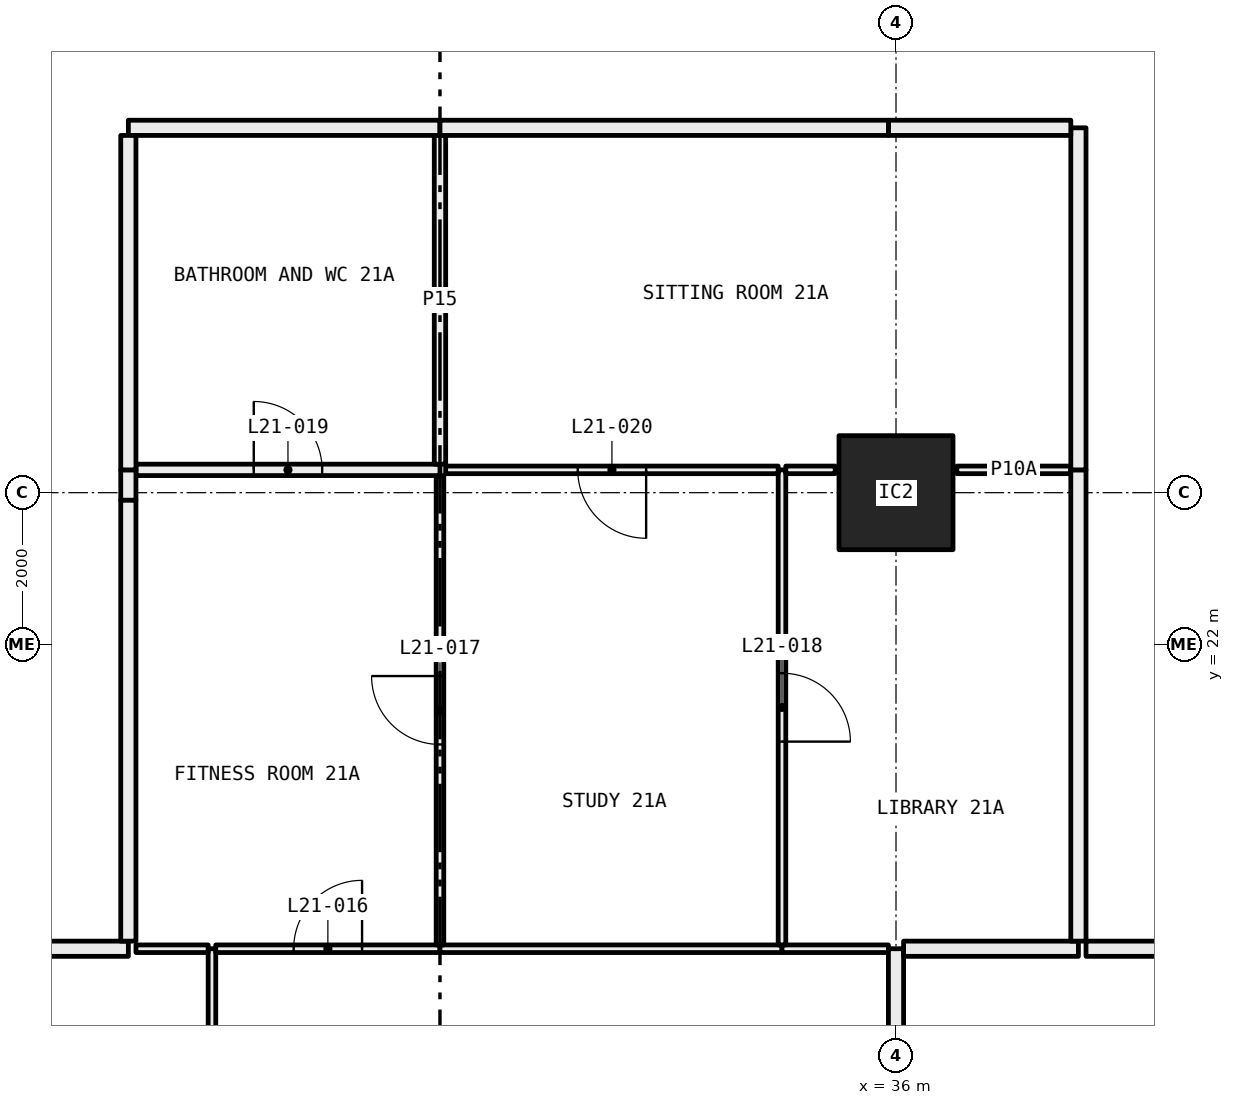
"""IFC4 building model, lengths in metres.
Left out: names, types, materials, properties, quantities, classifications, styles, units other than length and angle.
Written with IfcOpenShell. Run it as: python <this file> out.ifc"""

import sys

from ifc_helpers import new_model, si_unit, direction, frame, frame_2d, origin, origin_2d, place, context, subcontext, project, spatial, rectangle, hollow_rectangle, extrude, element, fill, save


model = new_model("IFC4")
c1 = context("Model", 3, precision=1e-05, world=origin(), true_north=direction((0.0, 1.0)))
c2 = subcontext(c1, "Body", "Model", "MODEL_VIEW")
j1 = project(units=[si_unit("LENGTHUNIT", "METRE"), si_unit("PLANEANGLEUNIT", "RADIAN")], contexts=[c1])
p1 = place(None, origin())
s1 = spatial("IfcSite", under=j1, at=p1, CompositionType="ELEMENT")
p2 = place(p1, origin())
s2 = spatial("IfcBuilding", under=s1, at=p2, CompositionType="ELEMENT")
p3 = place(p2, frame((0.0, 0.0, 85.2)))
s3 = spatial("IfcBuildingStorey", under=s2, at=p3, CompositionType="ELEMENT", Elevation=85.2)
p4 = place(p3, frame((36.0, 24.0, 0.0), z_axis=(0.0, 0.0, 1.0), x_axis=(1.0, 0.0, 0.0)))
e1 = element("IfcColumn", 1, at=p4, inside=s3, PredefinedType="COLUMN", context=c2, shape_type="SweptSolid", body=[
    extrude(hollow_rectangle(XDim=1.5, YDim=1.5, WallThickness=0.065, at=origin_2d()), origin(), (0.0, 0.0, 1.0), 3.05),
])
p5 = place(p3, frame((27.0, 12.05, 0.0), z_axis=(0.0, 0.0, 1.0), x_axis=(0.0, 1.0, 0.0)))
e2 = element("IfcWall", 2, at=p5, inside=s3, PredefinedType="PARTITIONING", context=c2, shape_type="SweptSolid", body=[
    extrude(rectangle(XDim=5.95, YDim=0.1, at=frame_2d((2.975, 0.0))), origin(), (0.0, 0.0, 1.0), 2.45),
])
p6 = place(p3, frame((26.95, 18.0, 0.0), z_axis=(0.0, 0.0, 1.0), x_axis=(-1.0, 0.0, 0.0)))
e3 = element("IfcWall", 3, at=p6, inside=s3, PredefinedType="PARTITIONING", context=c2, shape_type="SweptSolid", body=[
    extrude(rectangle(XDim=0.95, YDim=0.1, at=frame_2d((0.475, 0.0))), origin(), (0.0, 0.0, 1.0), 3.05),
])
p7 = place(p3, frame((25.9, 18.0, 0.0), z_axis=(0.0, 0.0, 1.0), x_axis=(-1.0, 0.0, 0.0)))
e4 = element("IfcWall", 4, at=p7, inside=s3, PredefinedType="PARTITIONING", context=c2, shape_type="SweptSolid", body=[
    extrude(rectangle(XDim=6.4, YDim=0.2, at=frame_2d((3.2, 0.0))), origin(), (0.0, 0.0, 1.0), 3.05),
])
p8 = place(p3, frame((30.0, 18.0, 0.0), z_axis=(0.0, 0.0, 1.0), x_axis=(-1.0, 0.0, 0.0)))
e5 = element("IfcWall", 5, at=p8, inside=s3, PredefinedType="PARTITIONING", context=c2, shape_type="SweptSolid", body=[
    extrude(rectangle(XDim=2.95, YDim=0.1, at=frame_2d((1.475, 0.0))), origin(), (0.0, 0.0, 1.0), 3.05),
])
p9 = place(p8, frame((1.025, 0.0, 0.0)))
e6 = element("IfcOpeningElement", 6, at=p9, cuts=e5, PredefinedType="OPENING", context=c2, shape_type="SweptSolid", body=[
    extrude(rectangle(XDim=0.9, YDim=2.1, at=frame_2d((0.45, 1.05))), frame((0.0, 0.06, 0.0), z_axis=(0.0, -1.0, 0.0), x_axis=(1.0, 0.0, 0.0)), (0.0, 0.0, 1.0), 0.12),
])
p10 = place(p3, frame((34.5, 18.0, 0.0), z_axis=(0.0, 0.0, 1.0), x_axis=(-1.0, 0.0, 0.0)))
e7 = element("IfcWall", 7, at=p10, inside=s3, PredefinedType="PARTITIONING", context=c2, shape_type="SweptSolid", body=[
    extrude(rectangle(XDim=4.5, YDim=0.1, at=frame_2d((2.25, 0.0))), origin(), (0.0, 0.0, 1.0), 3.05),
])
p11 = place(p3, frame((35.9, 18.0, 0.0), z_axis=(0.0, 0.0, 1.0), x_axis=(-1.0, 0.0, 0.0)))
e8 = element("IfcWall", 8, at=p11, inside=s3, PredefinedType="PARTITIONING", context=c2, shape_type="SweptSolid", body=[
    extrude(rectangle(XDim=1.4, YDim=0.1, at=frame_2d((0.7, 0.0))), origin(), (0.0, 0.0, 1.0), 3.05),
])
p12 = place(p3, frame((36.0, 12.8, 0.0), z_axis=(0.0, 0.0, 1.0), x_axis=(0.0, 1.0, 0.0)))
e9 = element("IfcWall", 9, at=p12, inside=s3, PredefinedType="PARTITIONING", context=c2, shape_type="SweptSolid", body=[
    extrude(rectangle(XDim=5.2, YDim=0.2, at=frame_2d((2.6, 0.0))), origin(), (0.0, 0.0, 1.0), 2.45),
])
p13 = place(p3, frame((30.0, 18.05, 0.0), z_axis=(0.0, 0.0, 1.0), x_axis=(0.0, 1.0, 0.0)))
e10 = element("IfcWall", 10, at=p13, inside=s3, PredefinedType="PARTITIONING", context=c2, shape_type="SweptSolid", body=[
    extrude(rectangle(XDim=6.175, YDim=0.1, at=frame_2d((3.087, 0.0))), origin(), (0.0, 0.0, 1.0), 2.45),
])
p14 = place(p13, frame((2.637, 0.0, 0.0)))
e11 = element("IfcOpeningElement", 11, at=p14, cuts=e10, PredefinedType="OPENING", context=c2, shape_type="SweptSolid", body=[
    extrude(rectangle(XDim=0.9, YDim=2.1, at=frame_2d((0.45, 1.05))), frame((0.0, 0.06, 0.0), z_axis=(0.0, -1.0, 0.0), x_axis=(1.0, 0.0, 0.0)), (0.0, 0.0, 1.0), 0.12),
])
p15 = place(p3, frame((30.0, 24.3, 0.0), z_axis=(0.0, 0.0, 1.0), x_axis=(-1.0, 0.0, 0.0)))
e12 = element("IfcWall", 12, at=p15, inside=s3, PredefinedType="PARTITIONING", context=c2, shape_type="SweptSolid", body=[
    extrude(rectangle(XDim=4.0, YDim=0.15, at=frame_2d((2.0, 0.0))), origin(), (0.0, 0.0, 1.0), 3.05),
])
p16 = place(p15, frame((1.55, 0.0, 0.0)))
e13 = element("IfcOpeningElement", 13, at=p16, cuts=e12, PredefinedType="OPENING", context=c2, shape_type="SweptSolid", body=[
    extrude(rectangle(XDim=0.9, YDim=2.1, at=frame_2d((0.45, 1.05))), frame((0.0, 0.085, 0.0), z_axis=(0.0, -1.0, 0.0), x_axis=(1.0, 0.0, 0.0)), (0.0, 0.0, 1.0), 0.17),
])
p17 = place(p3, frame((25.9, 24.3, 0.0), z_axis=(0.0, 0.0, 1.0), x_axis=(0.0, -1.0, 0.0)))
e14 = element("IfcWall", 14, at=p17, inside=s3, PredefinedType="PARTITIONING", context=c2, shape_type="SweptSolid", body=[
    extrude(rectangle(XDim=0.4, YDim=0.2, at=frame_2d((0.2, 0.0))), origin(), (0.0, 0.0, 1.0), 2.45),
])
p18 = place(p3, frame((25.9, 23.9, 0.0), z_axis=(0.0, 0.0, 1.0), x_axis=(0.0, -1.0, 0.0)))
e15 = element("IfcWall", 15, at=p18, inside=s3, PredefinedType="PARTITIONING", context=c2, shape_type="SweptSolid", body=[
    extrude(rectangle(XDim=5.8, YDim=0.2, at=frame_2d((2.9, 0.0))), origin(), (0.0, 0.0, 1.0), 3.05),
])
p19 = place(p3, frame((34.5, 18.05, 0.0), z_axis=(0.0, 0.0, 1.0), x_axis=(0.0, 1.0, 0.0)))
e16 = element("IfcWall", 16, at=p19, inside=s3, PredefinedType="PARTITIONING", context=c2, shape_type="SweptSolid", body=[
    extrude(rectangle(XDim=6.25, YDim=0.1, at=frame_2d((3.125, 0.0))), origin(), (0.0, 0.0, 1.0), 2.45),
])
p20 = place(p19, frame((2.675, 0.0, 0.0)))
e17 = element("IfcOpeningElement", 17, at=p20, cuts=e16, PredefinedType="OPENING", context=c2, shape_type="SweptSolid", body=[
    extrude(rectangle(XDim=0.9, YDim=2.1, at=frame_2d((0.45, 1.05))), frame((0.0, 0.06, 0.0), z_axis=(0.0, -1.0, 0.0), x_axis=(1.0, 0.0, 0.0)), (0.0, 0.0, 1.0), 0.12),
])
p21 = place(p3, frame((34.45, 24.3, 0.0), z_axis=(0.0, 0.0, 1.0), x_axis=(-1.0, 0.0, 0.0)))
e18 = element("IfcWall", 18, at=p21, inside=s3, PredefinedType="PARTITIONING", context=c2, shape_type="SweptSolid", body=[
    extrude(rectangle(XDim=4.375, YDim=0.1, at=frame_2d((2.188, 0.0))), origin(), (0.0, 0.0, 1.0), 3.05),
])
p22 = place(p21, frame((1.738, 0.0, 0.0)))
e19 = element("IfcOpeningElement", 19, at=p22, cuts=e18, PredefinedType="OPENING", context=c2, shape_type="SweptSolid", body=[
    extrude(rectangle(XDim=0.9, YDim=2.1, at=frame_2d((0.45, 1.05))), frame((0.0, 0.06, 0.0), z_axis=(0.0, -1.0, 0.0), x_axis=(1.0, 0.0, 0.0)), (0.0, 0.0, 1.0), 0.12),
])
p23 = place(p3, frame((35.2, 24.3, 0.0), z_axis=(0.0, 0.0, 1.0), x_axis=(-1.0, 0.0, 0.0)))
e20 = element("IfcWall", 20, at=p23, inside=s3, PredefinedType="PARTITIONING", context=c2, shape_type="SweptSolid", body=[
    extrude(rectangle(XDim=0.65, YDim=0.1, at=frame_2d((0.325, 0.0))), origin(), (0.0, 0.0, 1.0), 3.05),
])
p24 = place(p3, frame((38.3, 24.3, 0.0), z_axis=(0.0, 0.0, 1.0), x_axis=(-1.0, 0.0, 0.0)))
e21 = element("IfcWall", 21, at=p24, inside=s3, PredefinedType="PARTITIONING", context=c2, shape_type="SweptSolid", body=[
    extrude(rectangle(XDim=1.5, YDim=0.1, at=frame_2d((0.75, 0.0))), origin(), (0.0, 0.0, 1.0), 3.05),
])
p25 = place(p3, frame((36.1, 18.0, 0.0), z_axis=(0.0, 0.0, 1.0), x_axis=(1.0, 0.0, 0.0)))
e22 = element("IfcWall", 22, at=p25, inside=s3, PredefinedType="PARTITIONING", context=c2, shape_type="SweptSolid", body=[
    extrude(rectangle(XDim=2.3, YDim=0.2, at=frame_2d((1.15, 0.0))), origin(), (0.0, 0.0, 1.0), 3.05),
])
p26 = place(p3, frame((38.4, 18.1, 0.0), z_axis=(0.0, 0.0, 1.0), x_axis=(0.0, 1.0, 0.0)))
e23 = element("IfcWall", 23, at=p26, inside=s3, PredefinedType="PARTITIONING", context=c2, shape_type="SweptSolid", body=[
    extrude(rectangle(XDim=6.2, YDim=0.2, at=frame_2d((3.1, 0.0))), origin(), (0.0, 0.0, 1.0), 2.45),
])
p27 = place(p3, frame((30.0, 24.375, 0.0), z_axis=(0.0, 0.0, 1.0), x_axis=(0.0, 1.0, 0.0)))
e24 = element("IfcWall", 24, at=p27, inside=s3, PredefinedType="PARTITIONING", context=c2, shape_type="SweptSolid", body=[
    extrude(rectangle(XDim=4.325, YDim=0.15, at=frame_2d((2.163, 0.0))), origin(), (0.0, 0.0, 1.0), 3.05),
])
p28 = place(p3, frame((30.0, 28.8, 0.0), z_axis=(0.0, 0.0, 1.0), x_axis=(-1.0, 0.0, 0.0)))
e25 = element("IfcWall", 25, at=p28, inside=s3, PredefinedType="PARTITIONING", context=c2, shape_type="SweptSolid", body=[
    extrude(rectangle(XDim=4.1, YDim=0.2, at=frame_2d((2.05, 0.0))), origin(), (0.0, 0.0, 1.0), 3.05),
])
p29 = place(p3, frame((25.9, 28.7, 0.0), z_axis=(0.0, 0.0, 1.0), x_axis=(0.0, -1.0, 0.0)))
e26 = element("IfcWall", 26, at=p29, inside=s3, PredefinedType="PARTITIONING", context=c2, shape_type="SweptSolid", body=[
    extrude(rectangle(XDim=4.4, YDim=0.2, at=frame_2d((2.2, 0.0))), origin(), (0.0, 0.0, 1.0), 3.05),
])
p30 = place(p3, frame((38.4, 24.3, 0.0), z_axis=(0.0, 0.0, 1.0), x_axis=(0.0, 1.0, 0.0)))
e27 = element("IfcWall", 27, at=p30, inside=s3, PredefinedType="PARTITIONING", context=c2, shape_type="SweptSolid", body=[
    extrude(rectangle(XDim=4.5, YDim=0.2, at=frame_2d((2.25, 0.0))), origin(), (0.0, 0.0, 1.0), 3.05),
])
p31 = place(p3, frame((38.3, 28.8, 0.0), z_axis=(0.0, 0.0, 1.0), x_axis=(-1.0, 0.0, 0.0)))
e28 = element("IfcWall", 28, at=p31, inside=s3, PredefinedType="PARTITIONING", context=c2, shape_type="SweptSolid", body=[
    extrude(rectangle(XDim=2.4, YDim=0.2, at=frame_2d((1.2, 0.0))), origin(), (0.0, 0.0, 1.0), 2.45),
])
p32 = place(p3, frame((35.9, 28.8, 0.0), z_axis=(0.0, 0.0, 1.0), x_axis=(-1.0, 0.0, 0.0)))
e29 = element("IfcWall", 29, at=p32, inside=s3, PredefinedType="PARTITIONING", context=c2, shape_type="SweptSolid", body=[
    extrude(rectangle(XDim=5.9, YDim=0.2, at=frame_2d((2.95, 0.0))), origin(), (0.0, 0.0, 1.0), 3.05),
])
p33 = place(p3, frame((40.8, 18.0, 0.0), z_axis=(0.0, 0.0, 1.0), x_axis=(-1.0, 0.0, 0.0)))
e30 = element("IfcWall", 30, at=p33, inside=s3, PredefinedType="PARTITIONING", context=c2, shape_type="SweptSolid", body=[
    extrude(rectangle(XDim=2.3, YDim=0.2, at=frame_2d((1.15, 0.0))), origin(), (0.0, 0.0, 1.0), 3.05),
])
p34 = place(p9, frame((0.9, 0.0, 0.0), x_axis=(-1.0, 0.0, 0.0)))
e31 = element("IfcDoor", 31, at=p34, inside=s3, OperationType="SINGLE_SWING_LEFT", PredefinedType="DOOR", context=c2, shape_type="SweptSolid", body=[
    extrude(rectangle(XDim=0.9, YDim=2.1, at=frame_2d((0.45, 1.05))), frame((0.0, 0.025, 0.0), z_axis=(0.0, -1.0, 0.0), x_axis=(1.0, 0.0, 0.0)), (0.0, 0.0, 1.0), 0.05),
])
fill(e6, e31)
p35 = place(p14, origin())
e32 = element("IfcDoor", 32, at=p35, inside=s3, OperationType="SINGLE_SWING_LEFT", PredefinedType="DOOR", context=c2, shape_type="SweptSolid", body=[
    extrude(rectangle(XDim=0.9, YDim=2.1, at=frame_2d((0.45, 1.05))), frame((0.0, 0.025, 0.0), z_axis=(0.0, -1.0, 0.0), x_axis=(1.0, 0.0, 0.0)), (0.0, 0.0, 1.0), 0.05),
])
fill(e11, e32)
p36 = place(p20, frame((0.9, 0.0, 0.0), x_axis=(-1.0, 0.0, 0.0)))
e33 = element("IfcDoor", 33, at=p36, inside=s3, OperationType="SINGLE_SWING_LEFT", PredefinedType="DOOR", context=c2, shape_type="SweptSolid", body=[
    extrude(rectangle(XDim=0.9, YDim=2.1, at=frame_2d((0.45, 1.05))), frame((0.0, 0.025, 0.0), z_axis=(0.0, -1.0, 0.0), x_axis=(1.0, 0.0, 0.0)), (0.0, 0.0, 1.0), 0.05),
])
fill(e17, e33)
p37 = place(p16, frame((0.9, 0.0, 0.0), x_axis=(-1.0, 0.0, 0.0)))
e34 = element("IfcDoor", 34, at=p37, inside=s3, OperationType="SINGLE_SWING_RIGHT", PredefinedType="DOOR", context=c2, shape_type="SweptSolid", body=[
    extrude(rectangle(XDim=0.9, YDim=2.1, at=frame_2d((0.45, 1.05))), frame((0.0, 0.025, 0.0), z_axis=(0.0, -1.0, 0.0), x_axis=(1.0, 0.0, 0.0)), (0.0, 0.0, 1.0), 0.05),
])
fill(e13, e34)
p38 = place(p22, origin())
e35 = element("IfcDoor", 35, at=p38, inside=s3, OperationType="SINGLE_SWING_RIGHT", PredefinedType="DOOR", context=c2, shape_type="SweptSolid", body=[
    extrude(rectangle(XDim=0.9, YDim=2.1, at=frame_2d((0.45, 1.05))), frame((0.0, 0.025, 0.0), z_axis=(0.0, -1.0, 0.0), x_axis=(1.0, 0.0, 0.0)), (0.0, 0.0, 1.0), 0.05),
])
fill(e19, e35)
save(model, sys.argv[1])
